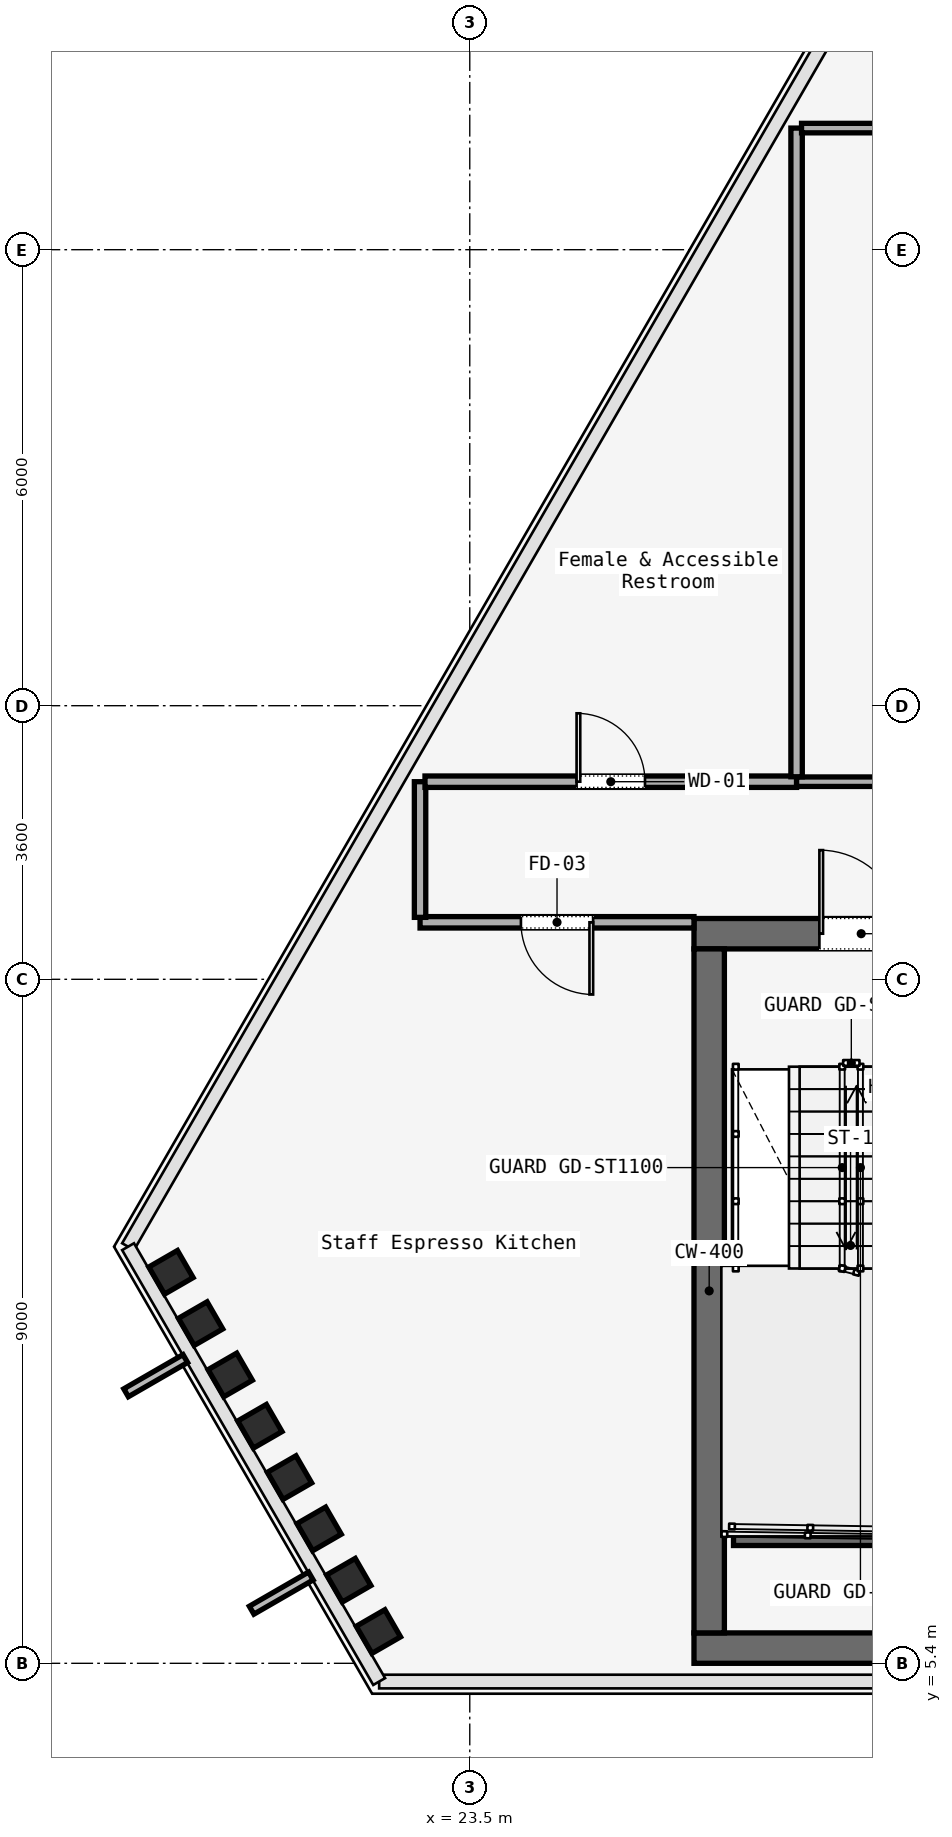
"""IFC4 building model, lengths in metres.
Left out: names, types, materials, properties, quantities, classifications, styles, units other than length and angle.
Written with IfcOpenShell. Run it as: python <this file> out.ifc"""

import sys

from ifc_helpers import new_model, si_unit, direction, frame, frame_2d, origin, origin_2d, place, context, subcontext, project, spatial, rectangle, i_section, extrude, element, fill, save


model = new_model("IFC4")
c1 = context("Model", 3, precision=1e-05, world=origin(), true_north=direction((0.0, 1.0)))
c2 = subcontext(c1, "Body", "Model", "MODEL_VIEW")
j1 = project(units=[si_unit("LENGTHUNIT", "METRE"), si_unit("PLANEANGLEUNIT", "RADIAN")], contexts=[c1])
p1 = place(None, origin())
s1 = spatial("IfcSite", under=j1, at=p1, CompositionType="ELEMENT")
p2 = place(p1, origin())
s2 = spatial("IfcBuilding", under=s1, at=p2, CompositionType="ELEMENT")
p3 = place(p2, frame((0.0, 0.0, 248.4)))
s3 = spatial("IfcBuildingStorey", under=s2, at=p3, CompositionType="ELEMENT", Elevation=248.4)
p4 = place(p3, frame((26.45, 15.0, 0.0), z_axis=(0.0, 0.0, 1.0), x_axis=(1.0, 0.0, 0.0)))
e1 = element("IfcWall", 1, at=p4, inside=s3, PredefinedType="SOLIDWALL", context=c2, shape_type="SweptSolid", body=[
    extrude(rectangle(XDim=31.1, YDim=0.4, at=frame_2d((15.55, 0.0))), origin(), (0.0, 0.0, 1.0), 3.58),
])
p5 = place(p4, frame((1.65, 0.0, 0.0)))
e2 = element("IfcOpeningElement", 2, at=p5, cuts=e1, PredefinedType="OPENING", context=c2, shape_type="SweptSolid", body=[
    extrude(rectangle(XDim=1.1, YDim=2.2, at=frame_2d((0.55, 1.1))), frame((0.0, 0.2, 0.0), z_axis=(0.0, -1.0, 0.0), x_axis=(1.0, 0.0, 0.0)), (0.0, 0.0, 1.0), 0.4),
])
p6 = place(p4, frame((13.65, 0.0, 0.0)))
e3 = element("IfcOpeningElement", 3, at=p6, cuts=e1, PredefinedType="OPENING", context=c2, shape_type="SweptSolid", body=[
    extrude(rectangle(XDim=1.1, YDim=2.2, at=frame_2d((0.55, 1.1))), frame((0.0, 0.2, 0.0), z_axis=(0.0, -1.0, 0.0), x_axis=(1.0, 0.0, 0.0)), (0.0, 0.0, 1.0), 0.4),
])
p7 = place(p4, frame((25.55, 0.0, 0.0)))
e4 = element("IfcOpeningElement", 4, at=p7, cuts=e1, PredefinedType="OPENING", context=c2, shape_type="SweptSolid", body=[
    extrude(rectangle(XDim=1.1, YDim=2.2, at=frame_2d((0.55, 1.1))), frame((0.0, 0.2, 0.0), z_axis=(0.0, -1.0, 0.0), x_axis=(1.0, 0.0, 0.0)), (0.0, 0.0, 1.0), 0.4),
])
p8 = place(p4, frame((19.35, 0.0, 0.0)))
e5 = element("IfcOpeningElement", 5, at=p8, cuts=e1, PredefinedType="OPENING", context=c2, shape_type="SweptSolid", body=[
    extrude(rectangle(XDim=1.1, YDim=2.2, at=frame_2d((0.55, 1.1))), frame((0.0, 0.2, 0.0), z_axis=(0.0, -1.0, 0.0), x_axis=(1.0, 0.0, 0.0)), (0.0, 0.0, 1.0), 0.4),
])
p9 = place(p4, frame((21.4, 0.0, 0.0)))
e6 = element("IfcOpeningElement", 6, at=p9, cuts=e1, PredefinedType="OPENING", context=c2, shape_type="SweptSolid", body=[
    extrude(rectangle(XDim=0.9, YDim=2.1, at=frame_2d((0.45, 1.05))), frame((0.0, 0.2, 0.0), z_axis=(0.0, -1.0, 0.0), x_axis=(1.0, 0.0, 0.0)), (0.0, 0.0, 1.0), 0.4),
])
p10 = place(p4, frame((5.14, 0.0, 0.0)))
e7 = element("IfcOpeningElement", 7, at=p10, cuts=e1, PredefinedType="OPENING", context=c2, shape_type="SweptSolid", body=[
    extrude(rectangle(XDim=0.95, YDim=2.2, at=frame_2d((0.475, 1.1))), frame((0.0, 0.2, 0.0), z_axis=(0.0, -1.0, 0.0), x_axis=(1.0, 0.0, 0.0)), (0.0, 0.0, 1.0), 0.4),
])
p11 = place(p4, frame((7.825, 0.0, 0.0)))
e8 = element("IfcOpeningElement", 8, at=p11, cuts=e1, PredefinedType="OPENING", context=c2, shape_type="SweptSolid", body=[
    extrude(rectangle(XDim=0.95, YDim=2.2, at=frame_2d((0.475, 1.1))), frame((0.0, 0.2, 0.0), z_axis=(0.0, -1.0, 0.0), x_axis=(1.0, 0.0, 0.0)), (0.0, 0.0, 1.0), 0.4),
])
p12 = place(p4, frame((10.46, 0.0, 0.0)))
e9 = element("IfcOpeningElement", 9, at=p12, cuts=e1, PredefinedType="OPENING", context=c2, shape_type="SweptSolid", body=[
    extrude(rectangle(XDim=0.95, YDim=2.2, at=frame_2d((0.475, 1.1))), frame((0.0, 0.2, 0.0), z_axis=(0.0, -1.0, 0.0), x_axis=(1.0, 0.0, 0.0)), (0.0, 0.0, 1.0), 0.4),
])
p13 = place(p4, frame((23.35, 0.0, 0.0)))
e10 = element("IfcOpeningElement", 10, at=p13, cuts=e1, PredefinedType="OPENING", context=c2, shape_type="SweptSolid", body=[
    extrude(rectangle(XDim=1.3, YDim=2.3, at=frame_2d((0.65, 1.15))), frame((0.0, 0.2, 0.0), z_axis=(0.0, -1.0, 0.0), x_axis=(1.0, 0.0, 0.0)), (0.0, 0.0, 1.0), 0.4),
])
p14 = place(p3, frame((26.45, 5.6, 0.0), z_axis=(0.0, 0.0, 1.0), x_axis=(1.0, 0.0, 0.0)))
e11 = element("IfcWall", 11, at=p14, inside=s3, PredefinedType="SOLIDWALL", context=c2, shape_type="SweptSolid", body=[
    extrude(rectangle(XDim=31.1, YDim=0.4, at=frame_2d((15.55, 0.0))), origin(), (0.0, 0.0, 1.0), 3.58),
])
p15 = place(p3, frame((26.65, 5.8, 0.0), z_axis=(0.0, 0.0, 1.0), x_axis=(0.0, 1.0, 0.0)))
e12 = element("IfcWall", 12, at=p15, inside=s3, PredefinedType="SOLIDWALL", context=c2, shape_type="SweptSolid", body=[
    extrude(rectangle(XDim=9.0, YDim=0.4, at=frame_2d((4.5, 0.0))), origin(), (0.0, 0.0, 1.0), 3.58),
])
p16 = place(p3, frame((19.569, 10.544, 0.0), z_axis=(0.044511969596, -0.130293762292, 0.990475754408), x_axis=(-0.750456045838, 0.650074909775, 0.11924065979)))
e13 = element("IfcColumn", 13, at=p16, inside=s3, PredefinedType="COLUMN", context=c2, shape_type="SweptSolid", body=[
    extrude(i_section(OverallWidth=0.412, OverallDepth=0.435, WebThickness=0.036, FlangeThickness=0.044, FilletRadius=0.015, at=origin_2d()), origin(), (0.0, 0.0, 1.0), 3.615),
])
p17 = place(p3, frame((19.959, 9.869, 0.0), z_axis=(0.03453480772, -0.113152281763, 0.9929772949), x_axis=(-0.72925124523, 0.676532004026, 0.10245520416)))
e14 = element("IfcColumn", 14, at=p17, inside=s3, PredefinedType="COLUMN", context=c2, shape_type="SweptSolid", body=[
    extrude(i_section(OverallWidth=0.412, OverallDepth=0.435, WebThickness=0.036, FlangeThickness=0.044, FilletRadius=0.015, at=origin_2d()), origin(), (0.0, 0.0, 1.0), 3.605),
])
p18 = place(p3, frame((20.348, 9.194, 0.0), z_axis=(0.024632735743, -0.095952309479, 0.995081093497), x_axis=(-0.698578734935, 0.710371408541, 0.085791683883)))
e15 = element("IfcColumn", 15, at=p18, inside=s3, PredefinedType="COLUMN", context=c2, shape_type="SweptSolid", body=[
    extrude(i_section(OverallWidth=0.412, OverallDepth=0.435, WebThickness=0.036, FlangeThickness=0.044, FilletRadius=0.015, at=origin_2d()), origin(), (0.0, 0.0, 1.0), 3.598),
])
p19 = place(p3, frame((20.738, 8.519, 0.0), z_axis=(0.014546809281, -0.078647936157, 0.996796314438), x_axis=(-0.648665532767, 0.75791503215, 0.069266374537)))
e16 = element("IfcColumn", 16, at=p19, inside=s3, PredefinedType="COLUMN", context=c2, shape_type="SweptSolid", body=[
    extrude(i_section(OverallWidth=0.412, OverallDepth=0.435, WebThickness=0.036, FlangeThickness=0.044, FilletRadius=0.015, at=origin_2d()), origin(), (0.0, 0.0, 1.0), 3.592),
])
p20 = place(p3, frame((21.128, 7.844, 0.0), z_axis=(0.004492319885, -0.061258907529, 0.998111800006), x_axis=(-0.561879806224, 0.825506788185, 0.053194229172)))
e17 = element("IfcColumn", 17, at=p20, inside=s3, PredefinedType="COLUMN", context=c2, shape_type="SweptSolid", body=[
    extrude(i_section(OverallWidth=0.412, OverallDepth=0.435, WebThickness=0.036, FlangeThickness=0.044, FilletRadius=0.015, at=origin_2d()), origin(), (0.0, 0.0, 1.0), 3.587),
])
p21 = place(p3, frame((21.518, 7.168, 0.0), z_axis=(-0.005654596027, -0.043806087294, 0.999024049891), x_axis=(-0.385125164829, 0.922071253543, 0.038251938581)))
e18 = element("IfcColumn", 18, at=p21, inside=s3, PredefinedType="COLUMN", context=c2, shape_type="SweptSolid", body=[
    extrude(i_section(OverallWidth=0.412, OverallDepth=0.435, WebThickness=0.036, FlangeThickness=0.044, FilletRadius=0.015, at=origin_2d()), origin(), (0.0, 0.0, 1.0), 3.583),
])
p22 = place(p3, frame((21.908, 6.493, 0.0), z_axis=(-0.015813602401, -0.026310562616, 0.99952873109), x_axis=(0.017371185195, 0.999495625368, 0.02658452171)))
e19 = element("IfcColumn", 19, at=p22, inside=s3, PredefinedType="COLUMN", context=c2, shape_type="SweptSolid", body=[
    extrude(i_section(OverallWidth=0.412, OverallDepth=0.435, WebThickness=0.036, FlangeThickness=0.044, FilletRadius=0.015, at=origin_2d()), origin(), (0.0, 0.0, 1.0), 3.582),
])
p23 = place(p3, frame((22.298, 5.818, 0.0), z_axis=(-0.025904104361, -0.008793761743, 0.999625753536), x_axis=(0.659025814522, 0.751747105842, 0.023691024698)))
e20 = element("IfcColumn", 20, at=p23, inside=s3, PredefinedType="COLUMN", context=c2, shape_type="SweptSolid", body=[
    extrude(i_section(OverallWidth=0.412, OverallDepth=0.435, WebThickness=0.036, FlangeThickness=0.044, FilletRadius=0.015, at=origin_2d()), origin(), (0.0, 0.0, 1.0), 3.581),
])
p24 = place(p3, frame((26.97, 7.05, 0.0), z_axis=(0.0, 0.0, 1.0), x_axis=(1.0, 0.0, 0.0)))
e21 = element("IfcWall", 21, at=p24, inside=s3, PredefinedType="SOLIDWALL", context=c2, shape_type="SweptSolid", body=[
    extrude(rectangle(XDim=3.115, YDim=0.2, at=frame_2d((1.558, 0.0))), origin(), (0.0, 0.0, 1.0), 3.8),
])
p25 = place(p3, frame((26.45, 15.15, 0.0), z_axis=(0.0, 0.0, 1.0), x_axis=(-1.0, 0.0, 0.0)))
e22 = element("IfcWall", 22, at=p25, inside=s3, PredefinedType="PARTITIONING", context=c2, shape_type="SweptSolid", body=[
    extrude(rectangle(XDim=3.604, YDim=0.15, at=frame_2d((1.802, 0.0))), origin(), (0.0, 0.0, 1.0), 3.01),
])
p26 = place(p25, frame((1.327, 0.0, 0.0)))
e23 = element("IfcOpeningElement", 23, at=p26, cuts=e22, PredefinedType="OPENING", context=c2, shape_type="SweptSolid", body=[
    extrude(rectangle(XDim=0.95, YDim=2.2, at=frame_2d((0.475, 1.1))), frame((0.0, 0.075, 0.0), z_axis=(0.0, -1.0, 0.0), x_axis=(1.0, 0.0, 0.0)), (0.0, 0.0, 1.0), 0.15),
])
p27 = place(p3, frame((22.846, 15.215, 0.0), z_axis=(0.0, 0.0, 1.0), x_axis=(0.0, 1.0, 0.0)))
e24 = element("IfcWall", 24, at=p27, inside=s3, PredefinedType="PARTITIONING", context=c2, shape_type="SweptSolid", body=[
    extrude(rectangle(XDim=1.785, YDim=0.15, at=frame_2d((0.893, 0.0))), origin(), (0.0, 0.0, 1.0), 3.01),
])
p28 = place(p3, frame((22.911, 17.0, 0.0), z_axis=(0.0, 0.0, 1.0), x_axis=(1.0, 0.0, 0.0)))
e25 = element("IfcWall", 25, at=p28, inside=s3, PredefinedType="PARTITIONING", context=c2, shape_type="SweptSolid", body=[
    extrude(rectangle(XDim=4.889, YDim=0.15, at=frame_2d((2.445, 0.0))), origin(), (0.0, 0.0, 1.0), 3.01),
])
p29 = place(p28, frame((1.994, 0.0, 0.0)))
e26 = element("IfcOpeningElement", 26, at=p29, cuts=e25, PredefinedType="OPENING", context=c2, shape_type="SweptSolid", body=[
    extrude(rectangle(XDim=0.9, YDim=2.15, at=frame_2d((0.45, 1.075))), frame((0.0, 0.075, 0.0), z_axis=(0.0, -1.0, 0.0), x_axis=(1.0, 0.0, 0.0)), (0.0, 0.0, 1.0), 0.15),
])
p30 = place(p3, frame((27.8, 17.0, 0.0), z_axis=(0.0, 0.0, 1.0), x_axis=(1.0, 0.0, 0.0)))
e27 = element("IfcWall", 27, at=p30, inside=s3, PredefinedType="PARTITIONING", context=c2, shape_type="SweptSolid", body=[
    extrude(rectangle(XDim=4.6, YDim=0.125, at=frame_2d((2.3, 0.0))), origin(), (0.0, 0.0, 1.0), 3.01),
])
p31 = place(p30, frame((1.825, 0.0, 0.0)))
e28 = element("IfcOpeningElement", 28, at=p31, cuts=e27, PredefinedType="OPENING", context=c2, shape_type="SweptSolid", body=[
    extrude(rectangle(XDim=0.95, YDim=2.2, at=frame_2d((0.475, 1.1))), frame((0.0, 0.062, 0.0), z_axis=(0.0, -1.0, 0.0), x_axis=(1.0, 0.0, 0.0)), (0.0, 0.0, 1.0), 0.125),
])
p32 = place(p3, frame((27.8, 25.6, 0.0), z_axis=(0.0, 0.0, 1.0), x_axis=(0.0, -1.0, 0.0)))
e29 = element("IfcWall", 29, at=p32, inside=s3, PredefinedType="PARTITIONING", context=c2, shape_type="SweptSolid", body=[
    extrude(rectangle(XDim=8.535, YDim=0.15, at=frame_2d((4.268, 0.0))), origin(), (0.0, 0.0, 1.0), 3.01),
])
p33 = place(p3, frame((27.865, 25.6, 0.0), z_axis=(0.0, 0.0, 1.0), x_axis=(1.0, 0.0, 0.0)))
e30 = element("IfcWall", 30, at=p33, inside=s3, PredefinedType="PARTITIONING", context=c2, shape_type="SweptSolid", body=[
    extrude(rectangle(XDim=4.535, YDim=0.125, at=frame_2d((2.268, 0.0))), origin(), (0.0, 0.0, 1.0), 3.01),
])
p34 = place(p5, origin())
e31 = element("IfcDoor", 31, at=p34, inside=s3, OperationType="SINGLE_SWING_LEFT", PredefinedType="DOOR", context=c2, shape_type="SweptSolid", body=[
    extrude(rectangle(XDim=1.1, YDim=2.2, at=frame_2d((0.55, 1.1))), frame((0.0, 0.025, 0.0), z_axis=(0.0, -1.0, 0.0), x_axis=(1.0, 0.0, 0.0)), (0.0, 0.0, 1.0), 0.05),
])
fill(e2, e31)
p35 = place(p26, origin())
e32 = element("IfcDoor", 32, at=p35, inside=s3, OperationType="SINGLE_SWING_LEFT", PredefinedType="DOOR", context=c2, shape_type="SweptSolid", body=[
    extrude(rectangle(XDim=0.95, YDim=2.2, at=frame_2d((0.475, 1.1))), frame((0.0, 0.025, 0.0), z_axis=(0.0, -1.0, 0.0), x_axis=(1.0, 0.0, 0.0)), (0.0, 0.0, 1.0), 0.05),
])
fill(e23, e32)
p36 = place(p29, origin())
e33 = element("IfcDoor", 33, at=p36, inside=s3, OperationType="SINGLE_SWING_RIGHT", PredefinedType="DOOR", context=c2, shape_type="SweptSolid", body=[
    extrude(rectangle(XDim=0.9, YDim=2.15, at=frame_2d((0.45, 1.075))), frame((0.0, 0.025, 0.0), z_axis=(0.0, -1.0, 0.0), x_axis=(1.0, 0.0, 0.0)), (0.0, 0.0, 1.0), 0.05),
])
fill(e26, e33)
save(model, sys.argv[1])
